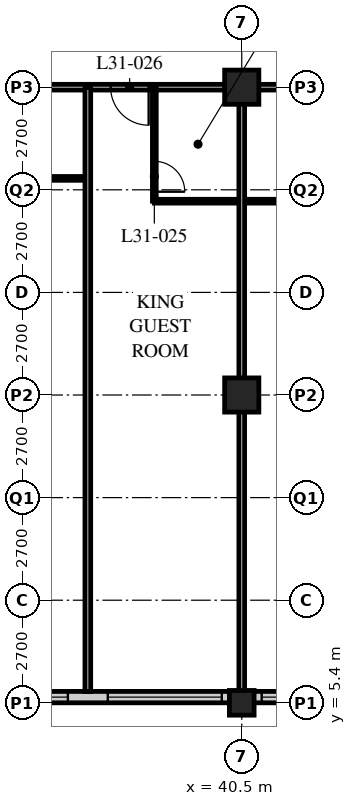
"""IFC4 building model, lengths in metres.
Left out: names, types, materials, properties, quantities, classifications, styles, units other than length and angle.
Written with IfcOpenShell. Run it as: python <this file> out.ifc"""

import sys

from ifc_helpers import new_model, si_unit, direction, frame, frame_2d, origin, origin_2d, place, context, subcontext, project, spatial, rectangle, hollow_rectangle, extrude, element, fill, save


model = new_model("IFC4")
c1 = context("Model", 3, precision=1e-05, world=origin(), true_north=direction((0.0, 1.0)))
c2 = subcontext(c1, "Body", "Model", "MODEL_VIEW")
j1 = project(units=[si_unit("LENGTHUNIT", "METRE"), si_unit("PLANEANGLEUNIT", "RADIAN")], contexts=[c1])
p1 = place(None, origin())
s1 = spatial("IfcSite", under=j1, at=p1, CompositionType="ELEMENT")
p2 = place(p1, origin())
s2 = spatial("IfcBuilding", under=s1, at=p2, CompositionType="ELEMENT")
p3 = place(p2, frame((0.0, 0.0, 123.8)))
s3 = spatial("IfcBuildingStorey", under=s2, at=p3, CompositionType="ELEMENT", Elevation=123.8)
p4 = place(p3, frame((40.5, 5.4, 0.0), z_axis=(0.0, 0.0, 1.0), x_axis=(1.0, 0.0, 0.0)))
e1 = element("IfcColumn", 1, at=p4, inside=s3, PredefinedType="COLUMN", context=c2, shape_type="SweptSolid", body=[
    extrude(hollow_rectangle(XDim=0.65, YDim=0.65, WallThickness=0.055, at=origin_2d()), origin(), (0.0, 0.0, 1.0), 3.4),
])
for number, where, z_axis, x_axis in (
    (2, (40.5, 13.5, 0.0), (0.0, 0.0, 1.0), (1.0, 0.0, 0.0)),
    (3, (40.5, 21.6, 0.0), (0.0, 0.0, 1.0), (1.0, 0.0, 0.0)),
):
    element("IfcColumn", number, at=place(p3, frame(where, z_axis=z_axis, x_axis=x_axis)), inside=s3, PredefinedType="COLUMN", context=c2, shape_type="SweptSolid", body=[
        extrude(hollow_rectangle(XDim=0.9, YDim=0.9, WallThickness=0.09, at=origin_2d()), origin(), (0.0, 0.0, 1.0), 3.4),
    ])
p5 = place(p3, frame((8.4, 5.55, 0.0), z_axis=(0.0, 0.0, 1.0), x_axis=(1.0, 0.0, 0.0)))
e4 = element("IfcWall", 4, at=p5, inside=s3, PredefinedType="SOLIDWALL", context=c2, shape_type="SweptSolid", body=[
    extrude(rectangle(XDim=40.2, YDim=0.3, at=frame_2d((20.1, 0.0))), origin(), (0.0, 0.0, 1.0), 3.19),
])
p6 = place(p5, frame((0.225, 0.0, 0.9)))
e5 = element("IfcOpeningElement", 5, at=p6, cuts=e4, PredefinedType="OPENING", context=c2, shape_type="SweptSolid", body=[
    extrude(rectangle(XDim=3.0, YDim=2.0, at=frame_2d((1.5, 1.0))), frame((0.0, 0.16, 0.0), z_axis=(0.0, -1.0, 0.0), x_axis=(1.0, 0.0, 0.0)), (0.0, 0.0, 1.0), 0.32),
])
p7 = place(p5, frame((4.275, 0.0, 0.9)))
e6 = element("IfcOpeningElement", 6, at=p7, cuts=e4, PredefinedType="OPENING", context=c2, shape_type="SweptSolid", body=[
    extrude(rectangle(XDim=3.0, YDim=2.0, at=frame_2d((1.5, 1.0))), frame((0.0, 0.16, 0.0), z_axis=(0.0, -1.0, 0.0), x_axis=(1.0, 0.0, 0.0)), (0.0, 0.0, 1.0), 0.32),
])
p8 = place(p5, frame((8.325, 0.0, 0.9)))
e7 = element("IfcOpeningElement", 7, at=p8, cuts=e4, PredefinedType="OPENING", context=c2, shape_type="SweptSolid", body=[
    extrude(rectangle(XDim=3.0, YDim=2.0, at=frame_2d((1.5, 1.0))), frame((0.0, 0.16, 0.0), z_axis=(0.0, -1.0, 0.0), x_axis=(1.0, 0.0, 0.0)), (0.0, 0.0, 1.0), 0.32),
])
p9 = place(p5, frame((12.375, 0.0, 0.9)))
e8 = element("IfcOpeningElement", 8, at=p9, cuts=e4, PredefinedType="OPENING", context=c2, shape_type="SweptSolid", body=[
    extrude(rectangle(XDim=3.0, YDim=2.0, at=frame_2d((1.5, 1.0))), frame((0.0, 0.16, 0.0), z_axis=(0.0, -1.0, 0.0), x_axis=(1.0, 0.0, 0.0)), (0.0, 0.0, 1.0), 0.32),
])
p10 = place(p5, frame((16.425, 0.0, 0.9)))
e9 = element("IfcOpeningElement", 9, at=p10, cuts=e4, PredefinedType="OPENING", context=c2, shape_type="SweptSolid", body=[
    extrude(rectangle(XDim=3.0, YDim=2.0, at=frame_2d((1.5, 1.0))), frame((0.0, 0.16, 0.0), z_axis=(0.0, -1.0, 0.0), x_axis=(1.0, 0.0, 0.0)), (0.0, 0.0, 1.0), 0.32),
])
p11 = place(p5, frame((20.475, 0.0, 0.9)))
e10 = element("IfcOpeningElement", 10, at=p11, cuts=e4, PredefinedType="OPENING", context=c2, shape_type="SweptSolid", body=[
    extrude(rectangle(XDim=3.0, YDim=2.0, at=frame_2d((1.5, 1.0))), frame((0.0, 0.16, 0.0), z_axis=(0.0, -1.0, 0.0), x_axis=(1.0, 0.0, 0.0)), (0.0, 0.0, 1.0), 0.32),
])
p12 = place(p5, frame((24.525, 0.0, 0.9)))
e11 = element("IfcOpeningElement", 11, at=p12, cuts=e4, PredefinedType="OPENING", context=c2, shape_type="SweptSolid", body=[
    extrude(rectangle(XDim=3.0, YDim=2.0, at=frame_2d((1.5, 1.0))), frame((0.0, 0.16, 0.0), z_axis=(0.0, -1.0, 0.0), x_axis=(1.0, 0.0, 0.0)), (0.0, 0.0, 1.0), 0.32),
])
p13 = place(p5, frame((28.575, 0.0, 0.9)))
e12 = element("IfcOpeningElement", 12, at=p13, cuts=e4, PredefinedType="OPENING", context=c2, shape_type="SweptSolid", body=[
    extrude(rectangle(XDim=3.0, YDim=2.0, at=frame_2d((1.5, 1.0))), frame((0.0, 0.16, 0.0), z_axis=(0.0, -1.0, 0.0), x_axis=(1.0, 0.0, 0.0)), (0.0, 0.0, 1.0), 0.32),
])
p14 = place(p5, frame((32.625, 0.0, 0.9)))
e13 = element("IfcOpeningElement", 13, at=p14, cuts=e4, PredefinedType="OPENING", context=c2, shape_type="SweptSolid", body=[
    extrude(rectangle(XDim=3.0, YDim=2.0, at=frame_2d((1.5, 1.0))), frame((0.0, 0.16, 0.0), z_axis=(0.0, -1.0, 0.0), x_axis=(1.0, 0.0, 0.0)), (0.0, 0.0, 1.0), 0.32),
])
p15 = place(p5, frame((36.675, 0.0, 0.9)))
e14 = element("IfcOpeningElement", 14, at=p15, cuts=e4, PredefinedType="OPENING", context=c2, shape_type="SweptSolid", body=[
    extrude(rectangle(XDim=3.0, YDim=2.0, at=frame_2d((1.5, 1.0))), frame((0.0, 0.16, 0.0), z_axis=(0.0, -1.0, 0.0), x_axis=(1.0, 0.0, 0.0)), (0.0, 0.0, 1.0), 0.32),
])
p16 = place(p3, frame((8.1, 21.6, 0.0), z_axis=(0.0, 0.0, 1.0), x_axis=(1.0, 0.0, 0.0)))
e15 = element("IfcWall", 15, at=p16, inside=s3, PredefinedType="PARTITIONING", context=c2, shape_type="SweptSolid", body=[
    extrude(rectangle(XDim=40.5, YDim=0.15, at=frame_2d((20.25, 0.0))), origin(), (0.0, 0.0, 1.0), 2.578),
])
p17 = place(p16, frame((9.625, 0.0, 0.0)))
e16 = element("IfcOpeningElement", 16, at=p17, cuts=e15, PredefinedType="OPENING", context=c2, shape_type="SweptSolid", body=[
    extrude(rectangle(XDim=1.0, YDim=2.1, at=frame_2d((0.5, 1.05))), frame((0.0, 0.085, 0.0), z_axis=(0.0, -1.0, 0.0), x_axis=(1.0, 0.0, 0.0)), (0.0, 0.0, 1.0), 0.17),
])
p18 = place(p16, frame((21.775, 0.0, 0.0)))
e17 = element("IfcOpeningElement", 17, at=p18, cuts=e15, PredefinedType="OPENING", context=c2, shape_type="SweptSolid", body=[
    extrude(rectangle(XDim=1.0, YDim=2.1, at=frame_2d((0.5, 1.05))), frame((0.0, 0.085, 0.0), z_axis=(0.0, -1.0, 0.0), x_axis=(1.0, 0.0, 0.0)), (0.0, 0.0, 1.0), 0.17),
])
p19 = place(p16, frame((28.95, 0.0, 0.0)))
e18 = element("IfcOpeningElement", 18, at=p19, cuts=e15, PredefinedType="OPENING", context=c2, shape_type="SweptSolid", body=[
    extrude(rectangle(XDim=1.0, YDim=2.1, at=frame_2d((0.5, 1.05))), frame((0.0, 0.085, 0.0), z_axis=(0.0, -1.0, 0.0), x_axis=(1.0, 0.0, 0.0)), (0.0, 0.0, 1.0), 0.17),
])
p20 = place(p16, frame((34.85, 0.0, 0.0)))
e19 = element("IfcOpeningElement", 19, at=p20, cuts=e15, PredefinedType="OPENING", context=c2, shape_type="SweptSolid", body=[
    extrude(rectangle(XDim=1.0, YDim=2.1, at=frame_2d((0.5, 1.05))), frame((0.0, 0.085, 0.0), z_axis=(0.0, -1.0, 0.0), x_axis=(1.0, 0.0, 0.0)), (0.0, 0.0, 1.0), 0.17),
])
p21 = place(p16, frame((1.525, 0.0, 0.0)))
e20 = element("IfcOpeningElement", 20, at=p21, cuts=e15, PredefinedType="OPENING", context=c2, shape_type="SweptSolid", body=[
    extrude(rectangle(XDim=1.0, YDim=2.1, at=frame_2d((0.5, 1.05))), frame((0.0, 0.085, 0.0), z_axis=(0.0, -1.0, 0.0), x_axis=(1.0, 0.0, 0.0)), (0.0, 0.0, 1.0), 0.17),
])
p22 = place(p16, frame((37.975, 0.0, 0.0)))
e21 = element("IfcOpeningElement", 21, at=p22, cuts=e15, PredefinedType="OPENING", context=c2, shape_type="SweptSolid", body=[
    extrude(rectangle(XDim=1.0, YDim=2.1, at=frame_2d((0.5, 1.05))), frame((0.0, 0.085, 0.0), z_axis=(0.0, -1.0, 0.0), x_axis=(1.0, 0.0, 0.0)), (0.0, 0.0, 1.0), 0.17),
])
p23 = place(p3, frame((33.85, 19.2, 0.0), z_axis=(0.0, 0.0, 1.0), x_axis=(1.0, 0.0, 0.0)))
e22 = element("IfcWall", 22, at=p23, inside=s3, PredefinedType="PARTITIONING", context=c2, shape_type="SweptSolid", body=[
    extrude(rectangle(XDim=2.6, YDim=0.1, at=frame_2d((1.3, 0.0))), origin(), (0.0, 0.0, 1.0), 3.19),
])
p24 = place(p3, frame((36.45, 21.6, 0.0), z_axis=(0.0, 0.0, 1.0), x_axis=(0.0, -1.0, 0.0)))
e23 = element("IfcWall", 23, at=p24, inside=s3, PredefinedType="PARTITIONING", context=c2, shape_type="SweptSolid", body=[
    extrude(rectangle(XDim=15.9, YDim=0.15, at=frame_2d((7.95, 0.0))), origin(), (0.0, 0.0, 1.0), 3.19),
])
p25 = place(p3, frame((38.2, 18.6, 0.0), z_axis=(0.0, 0.0, 1.0), x_axis=(1.0, 0.0, 0.0)))
e24 = element("IfcWall", 24, at=p25, inside=s3, PredefinedType="PARTITIONING", context=c2, shape_type="SweptSolid", body=[
    extrude(rectangle(XDim=4.6, YDim=0.1, at=frame_2d((2.3, 0.0))), origin(), (0.0, 0.0, 1.0), 3.19),
])
p26 = place(p3, frame((38.2, 21.6, 0.0), z_axis=(0.0, 0.0, 1.0), x_axis=(0.0, -1.0, 0.0)))
e25 = element("IfcWall", 25, at=p26, inside=s3, PredefinedType="PARTITIONING", context=c2, shape_type="SweptSolid", body=[
    extrude(rectangle(XDim=3.0, YDim=0.1, at=frame_2d((1.5, 0.0))), origin(), (0.0, 0.0, 1.0), 3.19),
])
p27 = place(p26, frame((1.95, 0.0, 0.0)))
e26 = element("IfcOpeningElement", 26, at=p27, cuts=e25, PredefinedType="OPENING", context=c2, shape_type="SweptSolid", body=[
    extrude(rectangle(XDim=0.8, YDim=2.1, at=frame_2d((0.4, 1.05))), frame((0.0, 0.06, 0.0), z_axis=(0.0, -1.0, 0.0), x_axis=(1.0, 0.0, 0.0)), (0.0, 0.0, 1.0), 0.12),
])
p28 = place(p3, frame((40.5, 21.6, 0.0), z_axis=(0.0, 0.0, 1.0), x_axis=(0.0, -1.0, 0.0)))
e27 = element("IfcWall", 27, at=p28, inside=s3, PredefinedType="PARTITIONING", context=c2, shape_type="SweptSolid", body=[
    extrude(rectangle(XDim=15.9, YDim=0.15, at=frame_2d((7.95, 0.0))), origin(), (0.0, 0.0, 1.0), 2.578),
])
p29 = place(p12, origin())
e28 = element("IfcWindow", 28, at=p29, inside=s3, PartitioningType="SINGLE_PANEL", PredefinedType="WINDOW", context=c2, shape_type="SweptSolid", body=[
    extrude(rectangle(XDim=3.0, YDim=2.0, at=frame_2d((1.5, 1.0))), frame((0.0, 0.03, 0.0), z_axis=(0.0, -1.0, 0.0), x_axis=(1.0, 0.0, 0.0)), (0.0, 0.0, 1.0), 0.06),
])
fill(e11, e28)
p30 = place(p13, origin())
e29 = element("IfcWindow", 29, at=p30, inside=s3, PartitioningType="SINGLE_PANEL", PredefinedType="WINDOW", context=c2, shape_type="SweptSolid", body=[
    extrude(rectangle(XDim=3.0, YDim=2.0, at=frame_2d((1.5, 1.0))), frame((0.0, 0.03, 0.0), z_axis=(0.0, -1.0, 0.0), x_axis=(1.0, 0.0, 0.0)), (0.0, 0.0, 1.0), 0.06),
])
fill(e12, e29)
p31 = place(p14, origin())
e30 = element("IfcWindow", 30, at=p31, inside=s3, PartitioningType="SINGLE_PANEL", PredefinedType="WINDOW", context=c2, shape_type="SweptSolid", body=[
    extrude(rectangle(XDim=3.0, YDim=2.0, at=frame_2d((1.5, 1.0))), frame((0.0, 0.03, 0.0), z_axis=(0.0, -1.0, 0.0), x_axis=(1.0, 0.0, 0.0)), (0.0, 0.0, 1.0), 0.06),
])
fill(e13, e30)
p32 = place(p27, origin())
e31 = element("IfcDoor", 31, at=p32, inside=s3, OperationType="SINGLE_SWING_RIGHT", PredefinedType="DOOR", context=c2, shape_type="SweptSolid", body=[
    extrude(rectangle(XDim=0.8, YDim=2.1, at=frame_2d((0.4, 1.05))), frame((0.0, 0.025, 0.0), z_axis=(0.0, -1.0, 0.0), x_axis=(1.0, 0.0, 0.0)), (0.0, 0.0, 1.0), 0.05),
])
fill(e26, e31)
p33 = place(p19, origin())
e32 = element("IfcDoor", 32, at=p33, inside=s3, OperationType="SINGLE_SWING_LEFT", PredefinedType="DOOR", context=c2, shape_type="SweptSolid", body=[
    extrude(rectangle(XDim=1.0, YDim=2.1, at=frame_2d((0.5, 1.05))), frame((0.0, 0.025, 0.0), z_axis=(0.0, -1.0, 0.0), x_axis=(1.0, 0.0, 0.0)), (0.0, 0.0, 1.0), 0.05),
])
fill(e18, e32)
save(model, sys.argv[1])
